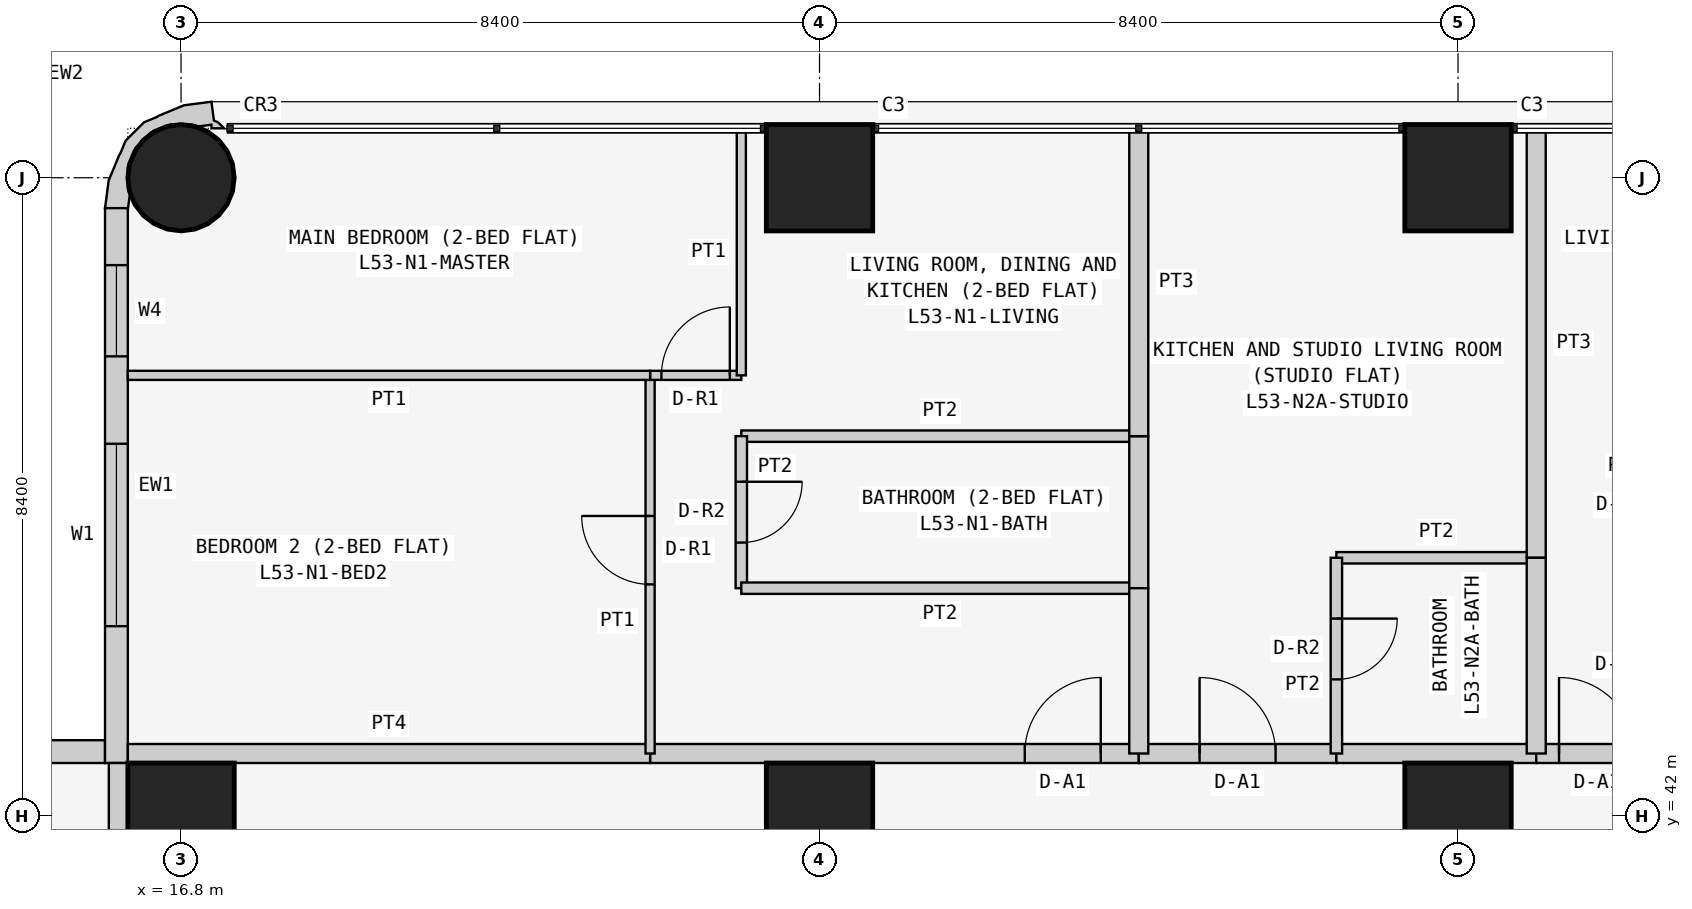
"""IFC4 building model, lengths in metres.
Left out: names, types, materials, properties, quantities, classifications, styles, units other than length and angle.
Written with IfcOpenShell. Run it as: python <this file> out.ifc"""

import sys

from ifc_helpers import new_model, si_unit, direction, frame, frame_2d, origin, origin_2d, place, context, subcontext, project, spatial, polyline, rectangle, circle, outline, extrude, element, fill, save


model = new_model("IFC4")
c1 = context("Model", 3, precision=1e-05, world=origin(), true_north=direction((0.0, 1.0)))
c2 = subcontext(c1, "Body", "Model", "MODEL_VIEW")
j1 = project(units=[si_unit("LENGTHUNIT", "METRE"), si_unit("PLANEANGLEUNIT", "RADIAN")], contexts=[c1])
p1 = place(None, origin())
s1 = spatial("IfcSite", under=j1, at=p1, CompositionType="ELEMENT")
p2 = place(p1, origin())
s2 = spatial("IfcBuilding", under=s1, at=p2, CompositionType="ELEMENT")
p3 = place(p2, frame((0.0, 0.0, 204.9)))
s3 = spatial("IfcBuildingStorey", under=s2, at=p3, CompositionType="ELEMENT", Elevation=204.9)
p4 = place(p3, frame((16.8, 42.0, 0.0), z_axis=(0.0, 0.0, 1.0), x_axis=(1.0, 0.0, 0.0)))
e1 = element("IfcColumn", 1, at=p4, inside=s3, PredefinedType="COLUMN", context=c2, shape_type="SweptSolid", body=[
    extrude(rectangle(XDim=1.4, YDim=1.4, at=origin_2d()), origin(), (0.0, 0.0, 1.0), 3.6),
])
p5 = place(p3, frame((16.8, 50.4, 0.0), z_axis=(0.0, 0.0, 1.0), x_axis=(1.0, 0.0, 0.0)))
e2 = element("IfcColumn", 2, at=p5, inside=s3, PredefinedType="COLUMN", context=c2, shape_type="SweptSolid", body=[
    extrude(circle(Radius=0.7, at=origin_2d()), origin(), (0.0, 0.0, 1.0), 3.6),
])
for number, where, z_axis, x_axis in (
    (3, (25.2, 42.0, 0.0), (0.0, 0.0, 1.0), (1.0, 0.0, 0.0)),
    (4, (25.2, 50.4, 0.0), (0.0, 0.0, 1.0), (1.0, 0.0, 0.0)),
    (5, (33.6, 42.0, 0.0), (0.0, 0.0, 1.0), (1.0, 0.0, 0.0)),
    (6, (33.6, 50.4, 0.0), (0.0, 0.0, 1.0), (1.0, 0.0, 0.0)),
):
    element("IfcColumn", number, at=place(p3, frame(where, z_axis=z_axis, x_axis=x_axis)), inside=s3, PredefinedType="COLUMN", context=c2, shape_type="SweptSolid", body=[
        extrude(rectangle(XDim=1.4, YDim=1.4, at=origin_2d()), origin(), (0.0, 0.0, 1.0), 3.6),
    ])
p6 = place(p3, frame((15.8, 42.85, 0.0), z_axis=(0.0, 0.0, 1.0), x_axis=(-1.0, 0.0, 0.0)))
e7 = element("IfcWall", 7, at=p6, inside=s3, PredefinedType="SOLIDWALL", context=c2, shape_type="SweptSolid", body=[
    extrude(rectangle(XDim=15.4, YDim=0.3, at=frame_2d((7.7, 0.0))), origin(), (0.0, 0.0, 1.0), 3.45),
])
p7 = place(p6, frame((1.2, 0.0, 0.9)))
e8 = element("IfcOpeningElement", 8, at=p7, cuts=e7, PredefinedType="OPENING", context=c2, shape_type="SweptSolid", body=[
    extrude(rectangle(XDim=1.8, YDim=1.5, at=frame_2d((0.9, 0.75))), frame((0.0, 0.16, 0.0), z_axis=(0.0, -1.0, 0.0), x_axis=(1.0, 0.0, 0.0)), (0.0, 0.0, 1.0), 0.32),
])
p8 = place(p6, frame((4.95, 0.0, 1.5)))
e9 = element("IfcOpeningElement", 9, at=p8, cuts=e7, PredefinedType="OPENING", context=c2, shape_type="SweptSolid", body=[
    extrude(rectangle(XDim=0.9, YDim=0.7, at=frame_2d((0.45, 0.35))), frame((0.0, 0.16, 0.0), z_axis=(0.0, -1.0, 0.0), x_axis=(1.0, 0.0, 0.0)), (0.0, 0.0, 1.0), 0.32),
])
p9 = place(p6, frame((8.5, 0.0, 0.9)))
e10 = element("IfcOpeningElement", 10, at=p9, cuts=e7, PredefinedType="OPENING", context=c2, shape_type="SweptSolid", body=[
    extrude(rectangle(XDim=1.8, YDim=1.5, at=frame_2d((0.9, 0.75))), frame((0.0, 0.16, 0.0), z_axis=(0.0, -1.0, 0.0), x_axis=(1.0, 0.0, 0.0)), (0.0, 0.0, 1.0), 0.32),
])
p10 = place(p6, frame((12.5, 0.0, 0.0)))
e11 = element("IfcOpeningElement", 11, at=p10, cuts=e7, PredefinedType="OPENING", context=c2, shape_type="SweptSolid", body=[
    extrude(rectangle(XDim=0.9, YDim=2.4, at=frame_2d((0.45, 1.2))), frame((0.0, 0.16, 0.0), z_axis=(0.0, -1.0, 0.0), x_axis=(1.0, 0.0, 0.0)), (0.0, 0.0, 1.0), 0.32),
])
p11 = place(p6, frame((13.5, 0.0, 0.9)))
e12 = element("IfcOpeningElement", 12, at=p11, cuts=e7, PredefinedType="OPENING", context=c2, shape_type="SweptSolid", body=[
    extrude(rectangle(XDim=1.2, YDim=1.5, at=frame_2d((0.6, 0.75))), frame((0.0, 0.16, 0.0), z_axis=(0.0, -1.0, 0.0), x_axis=(1.0, 0.0, 0.0)), (0.0, 0.0, 1.0), 0.32),
])
p12 = place(p3, frame((15.95, 50.0, 0.0), z_axis=(0.0, 0.0, 1.0), x_axis=(0.0, -1.0, 0.0)))
e13 = element("IfcWall", 13, at=p12, inside=s3, PredefinedType="SOLIDWALL", context=c2, shape_type="SweptSolid", body=[
    extrude(rectangle(XDim=7.3, YDim=0.3, at=frame_2d((3.65, 0.0))), origin(), (0.0, 0.0, 1.0), 3.45),
])
p13 = place(p12, frame((3.1, 0.0, 0.9)))
e14 = element("IfcOpeningElement", 14, at=p13, cuts=e13, PredefinedType="OPENING", context=c2, shape_type="SweptSolid", body=[
    extrude(rectangle(XDim=2.4, YDim=1.5, at=frame_2d((1.2, 0.75))), frame((0.0, 0.16, 0.0), z_axis=(0.0, -1.0, 0.0), x_axis=(1.0, 0.0, 0.0)), (0.0, 0.0, 1.0), 0.32),
])
p14 = place(p12, frame((0.75, 0.0, 0.9)))
e15 = element("IfcOpeningElement", 15, at=p14, cuts=e13, PredefinedType="OPENING", context=c2, shape_type="SweptSolid", body=[
    extrude(rectangle(XDim=1.2, YDim=1.5, at=frame_2d((0.6, 0.75))), frame((0.0, 0.16, 0.0), z_axis=(0.0, -1.0, 0.0), x_axis=(1.0, 0.0, 0.0)), (0.0, 0.0, 1.0), 0.32),
])
p15 = place(p3, frame((17.312, 50.988, 0.0), z_axis=(0.0, 0.0, 1.0), x_axis=(-0.439933741929, 0.898030234854, 0.0)))
e16 = element("IfcWall", 16, at=p15, inside=s3, PredefinedType="SOLIDWALL", context=c2, shape_type="SweptSolid", body=[
    extrude(outline(polyline([(0.138, -0.039), (0.182, -0.0), (0.419, -0.08), (0.536, 0.266), (0.559, 0.631), (0.555, 0.651), (0.566, 0.836), (0.456, 1.159), (0.333, 1.298), (0.324, 1.316), (0.082, 1.591), (-0.222, 1.793), (-0.39, 1.541), (-0.372, 1.532), (-0.195, 1.414), (-0.12, 1.41), (0.131, 1.287), (0.315, 1.078), (0.406, 0.814), (0.388, 0.536), (0.265, 0.285), (0.209, 0.236), (0.148, 0.053), (0.105, 0.074), (0.032, -0.076), (0.138, -0.039)])), origin(), (0.0, 0.0, 1.0), 3.45),
])
p16 = place(p3, frame((22.971, 42.825, 0.0), z_axis=(0.0, 0.0, 1.0), x_axis=(1.0, 0.0, 0.0)))
e17 = element("IfcWall", 17, at=p16, inside=s3, PredefinedType="PARTITIONING", context=c2, shape_type="SweptSolid", body=[
    extrude(rectangle(XDim=6.429, YDim=0.25, at=frame_2d((3.214, 0.0))), origin(), (0.0, 0.0, 1.0), 3.45),
])
p17 = place(p16, frame((4.929, 0.0, 0.0)))
e18 = element("IfcOpeningElement", 18, at=p17, cuts=e17, PredefinedType="OPENING", context=c2, shape_type="SweptSolid", body=[
    extrude(rectangle(XDim=1.0, YDim=2.1, at=frame_2d((0.5, 1.05))), frame((0.0, 0.135, 0.0), z_axis=(0.0, -1.0, 0.0), x_axis=(1.0, 0.0, 0.0)), (0.0, 0.0, 1.0), 0.27),
])
p18 = place(p3, frame((16.1, 42.825, 0.0), z_axis=(0.0, 0.0, 1.0), x_axis=(1.0, 0.0, 0.0)))
e19 = element("IfcWall", 19, at=p18, inside=s3, PredefinedType="PARTITIONING", context=c2, shape_type="SweptSolid", body=[
    extrude(rectangle(XDim=6.871, YDim=0.25, at=frame_2d((3.436, 0.0))), origin(), (0.0, 0.0, 1.0), 3.45),
])
p19 = place(p3, frame((29.4, 42.825, 0.0), z_axis=(0.0, 0.0, 1.0), x_axis=(1.0, 0.0, 0.0)))
e20 = element("IfcWall", 20, at=p19, inside=s3, PredefinedType="PARTITIONING", context=c2, shape_type="SweptSolid", body=[
    extrude(rectangle(XDim=2.6, YDim=0.25, at=frame_2d((1.3, 0.0))), origin(), (0.0, 0.0, 1.0), 3.45),
])
p20 = place(p19, frame((0.8, 0.0, 0.0)))
e21 = element("IfcOpeningElement", 21, at=p20, cuts=e20, PredefinedType="OPENING", context=c2, shape_type="SweptSolid", body=[
    extrude(rectangle(XDim=1.0, YDim=2.1, at=frame_2d((0.5, 1.05))), frame((0.0, 0.135, 0.0), z_axis=(0.0, -1.0, 0.0), x_axis=(1.0, 0.0, 0.0)), (0.0, 0.0, 1.0), 0.27),
])
p21 = place(p3, frame((32.0, 42.825, 0.0), z_axis=(0.0, 0.0, 1.0), x_axis=(1.0, 0.0, 0.0)))
e22 = element("IfcWall", 22, at=p21, inside=s3, PredefinedType="PARTITIONING", context=c2, shape_type="SweptSolid", body=[
    extrude(rectangle(XDim=2.629, YDim=0.25, at=frame_2d((1.314, 0.0))), origin(), (0.0, 0.0, 1.0), 3.45),
])
p22 = place(p3, frame((34.629, 42.825, 0.0), z_axis=(0.0, 0.0, 1.0), x_axis=(1.0, 0.0, 0.0)))
e23 = element("IfcWall", 23, at=p22, inside=s3, PredefinedType="PARTITIONING", context=c2, shape_type="SweptSolid", body=[
    extrude(rectangle(XDim=1.6, YDim=0.25, at=frame_2d((0.8, 0.0))), origin(), (0.0, 0.0, 1.0), 3.45),
])
p23 = place(p22, frame((0.3, 0.0, 0.0)))
e24 = element("IfcOpeningElement", 24, at=p23, cuts=e23, PredefinedType="OPENING", context=c2, shape_type="SweptSolid", body=[
    extrude(rectangle(XDim=1.0, YDim=2.1, at=frame_2d((0.5, 1.05))), frame((0.0, 0.135, 0.0), z_axis=(0.0, -1.0, 0.0), x_axis=(1.0, 0.0, 0.0)), (0.0, 0.0, 1.0), 0.27),
])
p24 = place(p3, frame((15.975, 35.829, 0.0), z_axis=(0.0, 0.0, 1.0), x_axis=(0.0, 1.0, 0.0)))
e25 = element("IfcWall", 25, at=p24, inside=s3, PredefinedType="PARTITIONING", context=c2, shape_type="SweptSolid", body=[
    extrude(rectangle(XDim=6.871, YDim=0.25, at=frame_2d((3.436, 0.0))), origin(), (0.0, 0.0, 1.0), 3.45),
])
p25 = place(p3, frame((29.4, 47.0, 0.0), z_axis=(0.0, 0.0, 1.0), x_axis=(-1.0, 0.0, 0.0)))
e26 = element("IfcWall", 26, at=p25, inside=s3, PredefinedType="PARTITIONING", context=c2, shape_type="SweptSolid", body=[
    extrude(rectangle(XDim=5.229, YDim=0.15, at=frame_2d((2.615, 0.0))), origin(), (0.0, 0.0, 1.0), 3.45),
])
p26 = place(p3, frame((24.171, 47.0, 0.0), z_axis=(0.0, 0.0, 1.0), x_axis=(0.0, -1.0, 0.0)))
e27 = element("IfcWall", 27, at=p26, inside=s3, PredefinedType="PARTITIONING", context=c2, shape_type="SweptSolid", body=[
    extrude(rectangle(XDim=2.0, YDim=0.15, at=frame_2d((1.0, 0.0))), origin(), (0.0, 0.0, 1.0), 3.45),
])
p27 = place(p26, frame((0.6, 0.0, 0.0)))
e28 = element("IfcOpeningElement", 28, at=p27, cuts=e27, PredefinedType="OPENING", context=c2, shape_type="SweptSolid", body=[
    extrude(rectangle(XDim=0.8, YDim=2.1, at=frame_2d((0.4, 1.05))), frame((0.0, 0.085, 0.0), z_axis=(0.0, -1.0, 0.0), x_axis=(1.0, 0.0, 0.0)), (0.0, 0.0, 1.0), 0.17),
])
p28 = place(p3, frame((24.171, 45.0, 0.0), z_axis=(0.0, 0.0, 1.0), x_axis=(1.0, 0.0, 0.0)))
e29 = element("IfcWall", 29, at=p28, inside=s3, PredefinedType="PARTITIONING", context=c2, shape_type="SweptSolid", body=[
    extrude(rectangle(XDim=5.229, YDim=0.15, at=frame_2d((2.615, 0.0))), origin(), (0.0, 0.0, 1.0), 3.45),
])
p29 = place(p3, frame((29.4, 45.0, 0.0), z_axis=(0.0, 0.0, 1.0), x_axis=(0.0, 1.0, 0.0)))
e30 = element("IfcWall", 30, at=p29, inside=s3, PredefinedType="PARTITIONING", context=c2, shape_type="SweptSolid", body=[
    extrude(rectangle(XDim=2.0, YDim=0.25, at=frame_2d((1.0, 0.0))), origin(), (0.0, 0.0, 1.0), 2.848),
])
p30 = place(p3, frame((22.971, 42.825, 0.0), z_axis=(0.0, 0.0, 1.0), x_axis=(0.0, 1.0, 0.0)))
e31 = element("IfcWall", 31, at=p30, inside=s3, PredefinedType="PARTITIONING", context=c2, shape_type="SweptSolid", body=[
    extrude(rectangle(XDim=4.975, YDim=0.12, at=frame_2d((2.488, 0.0))), origin(), (0.0, 0.0, 1.0), 3.45),
])
p31 = place(p30, frame((2.225, 0.0, 0.0)))
e32 = element("IfcOpeningElement", 32, at=p31, cuts=e31, PredefinedType="OPENING", context=c2, shape_type="SweptSolid", body=[
    extrude(rectangle(XDim=0.9, YDim=2.1, at=frame_2d((0.45, 1.05))), frame((0.0, 0.07, 0.0), z_axis=(0.0, -1.0, 0.0), x_axis=(1.0, 0.0, 0.0)), (0.0, 0.0, 1.0), 0.14),
])
p32 = place(p3, frame((22.971, 47.8, 0.0), z_axis=(0.0, 0.0, 1.0), x_axis=(1.0, 0.0, 0.0)))
e33 = element("IfcWall", 33, at=p32, inside=s3, PredefinedType="PARTITIONING", context=c2, shape_type="SweptSolid", body=[
    extrude(rectangle(XDim=1.2, YDim=0.12, at=frame_2d((0.6, 0.0))), origin(), (0.0, 0.0, 1.0), 3.45),
])
p33 = place(p32, frame((0.149, 0.0, 0.0)))
e34 = element("IfcOpeningElement", 34, at=p33, cuts=e33, PredefinedType="OPENING", context=c2, shape_type="SweptSolid", body=[
    extrude(rectangle(XDim=0.9, YDim=2.1, at=frame_2d((0.45, 1.05))), frame((0.0, 0.07, 0.0), z_axis=(0.0, -1.0, 0.0), x_axis=(1.0, 0.0, 0.0)), (0.0, 0.0, 1.0), 0.14),
])
p34 = place(p3, frame((24.171, 47.8, 0.0), z_axis=(0.0, 0.0, 1.0), x_axis=(0.0, 1.0, 0.0)))
e35 = element("IfcWall", 35, at=p34, inside=s3, PredefinedType="PARTITIONING", context=c2, shape_type="SweptSolid", body=[
    extrude(rectangle(XDim=3.25, YDim=0.12, at=frame_2d((1.625, 0.0))), origin(), (0.0, 0.0, 1.0), 3.45),
])
p35 = place(p3, frame((29.4, 45.0, 0.0), z_axis=(0.0, 0.0, 1.0), x_axis=(0.0, -1.0, 0.0)))
e36 = element("IfcWall", 36, at=p35, inside=s3, PredefinedType="PARTITIONING", context=c2, shape_type="SweptSolid", body=[
    extrude(rectangle(XDim=2.175, YDim=0.25, at=frame_2d((1.087, 0.0))), origin(), (0.0, 0.0, 1.0), 2.848),
])
p36 = place(p3, frame((29.4, 51.05, 0.0), z_axis=(0.0, 0.0, 1.0), x_axis=(0.0, -1.0, 0.0)))
e37 = element("IfcWall", 37, at=p36, inside=s3, PredefinedType="PARTITIONING", context=c2, shape_type="SweptSolid", body=[
    extrude(rectangle(XDim=4.05, YDim=0.25, at=frame_2d((2.025, 0.0))), origin(), (0.0, 0.0, 1.0), 2.848),
])
p37 = place(p3, frame((22.971, 47.8, 0.0), z_axis=(0.0, 0.0, 1.0), x_axis=(-1.0, 0.0, 0.0)))
e38 = element("IfcWall", 38, at=p37, inside=s3, PredefinedType="PARTITIONING", context=c2, shape_type="SweptSolid", body=[
    extrude(rectangle(XDim=6.871, YDim=0.12, at=frame_2d((3.436, 0.0))), origin(), (0.0, 0.0, 1.0), 3.45),
])
p38 = place(p3, frame((34.629, 45.4, 0.0), z_axis=(0.0, 0.0, 1.0), x_axis=(-1.0, 0.0, 0.0)))
e39 = element("IfcWall", 39, at=p38, inside=s3, PredefinedType="PARTITIONING", context=c2, shape_type="SweptSolid", body=[
    extrude(rectangle(XDim=2.629, YDim=0.15, at=frame_2d((1.314, 0.0))), origin(), (0.0, 0.0, 1.0), 3.45),
])
p39 = place(p3, frame((32.0, 45.4, 0.0), z_axis=(0.0, 0.0, 1.0), x_axis=(0.0, -1.0, 0.0)))
e40 = element("IfcWall", 40, at=p39, inside=s3, PredefinedType="PARTITIONING", context=c2, shape_type="SweptSolid", body=[
    extrude(rectangle(XDim=2.575, YDim=0.15, at=frame_2d((1.288, 0.0))), origin(), (0.0, 0.0, 1.0), 3.45),
])
p40 = place(p39, frame((0.8, 0.0, 0.0)))
e41 = element("IfcOpeningElement", 41, at=p40, cuts=e40, PredefinedType="OPENING", context=c2, shape_type="SweptSolid", body=[
    extrude(rectangle(XDim=0.8, YDim=2.1, at=frame_2d((0.4, 1.05))), frame((0.0, 0.085, 0.0), z_axis=(0.0, -1.0, 0.0), x_axis=(1.0, 0.0, 0.0)), (0.0, 0.0, 1.0), 0.17),
])
p41 = place(p3, frame((34.629, 51.05, 0.0), z_axis=(0.0, 0.0, 1.0), x_axis=(0.0, -1.0, 0.0)))
e42 = element("IfcWall", 42, at=p41, inside=s3, PredefinedType="PARTITIONING", context=c2, shape_type="SweptSolid", body=[
    extrude(rectangle(XDim=5.65, YDim=0.25, at=frame_2d((2.825, 0.0))), origin(), (0.0, 0.0, 1.0), 3.45),
])
p42 = place(p3, frame((34.629, 45.4, 0.0), z_axis=(0.0, 0.0, 1.0), x_axis=(0.0, -1.0, 0.0)))
e43 = element("IfcWall", 43, at=p42, inside=s3, PredefinedType="PARTITIONING", context=c2, shape_type="SweptSolid", body=[
    extrude(rectangle(XDim=2.575, YDim=0.25, at=frame_2d((1.288, 0.0))), origin(), (0.0, 0.0, 1.0), 3.45),
])
p43 = place(p13, origin())
e44 = element("IfcWindow", 44, at=p43, inside=s3, PartitioningType="SINGLE_PANEL", PredefinedType="WINDOW", context=c2, shape_type="SweptSolid", body=[
    extrude(rectangle(XDim=2.4, YDim=1.5, at=frame_2d((1.2, 0.75))), frame((0.0, 0.03, 0.0), z_axis=(0.0, -1.0, 0.0), x_axis=(1.0, 0.0, 0.0)), (0.0, 0.0, 1.0), 0.06),
])
fill(e14, e44)
p44 = place(p14, origin())
e45 = element("IfcWindow", 45, at=p44, inside=s3, PartitioningType="SINGLE_PANEL", PredefinedType="WINDOW", context=c2, shape_type="SweptSolid", body=[
    extrude(rectangle(XDim=1.2, YDim=1.5, at=frame_2d((0.6, 0.75))), frame((0.0, 0.03, 0.0), z_axis=(0.0, -1.0, 0.0), x_axis=(1.0, 0.0, 0.0)), (0.0, 0.0, 1.0), 0.06),
])
fill(e15, e45)
p45 = place(p17, origin())
e46 = element("IfcDoor", 46, at=p45, inside=s3, OperationType="SINGLE_SWING_RIGHT", PredefinedType="DOOR", context=c2, shape_type="SweptSolid", body=[
    extrude(rectangle(XDim=1.0, YDim=2.1, at=frame_2d((0.5, 1.05))), frame((0.0, 0.025, 0.0), z_axis=(0.0, -1.0, 0.0), x_axis=(1.0, 0.0, 0.0)), (0.0, 0.0, 1.0), 0.05),
])
fill(e18, e46)
p46 = place(p27, origin())
e47 = element("IfcDoor", 47, at=p46, inside=s3, OperationType="SINGLE_SWING_LEFT", PredefinedType="DOOR", context=c2, shape_type="SweptSolid", body=[
    extrude(rectangle(XDim=0.8, YDim=2.1, at=frame_2d((0.4, 1.05))), frame((0.0, 0.025, 0.0), z_axis=(0.0, -1.0, 0.0), x_axis=(1.0, 0.0, 0.0)), (0.0, 0.0, 1.0), 0.05),
])
fill(e28, e47)
p47 = place(p31, origin())
e48 = element("IfcDoor", 48, at=p47, inside=s3, OperationType="SINGLE_SWING_RIGHT", PredefinedType="DOOR", context=c2, shape_type="SweptSolid", body=[
    extrude(rectangle(XDim=0.9, YDim=2.1, at=frame_2d((0.45, 1.05))), frame((0.0, 0.025, 0.0), z_axis=(0.0, -1.0, 0.0), x_axis=(1.0, 0.0, 0.0)), (0.0, 0.0, 1.0), 0.05),
])
fill(e32, e48)
p48 = place(p33, origin())
e49 = element("IfcDoor", 49, at=p48, inside=s3, OperationType="SINGLE_SWING_RIGHT", PredefinedType="DOOR", context=c2, shape_type="SweptSolid", body=[
    extrude(rectangle(XDim=0.9, YDim=2.1, at=frame_2d((0.45, 1.05))), frame((0.0, 0.025, 0.0), z_axis=(0.0, -1.0, 0.0), x_axis=(1.0, 0.0, 0.0)), (0.0, 0.0, 1.0), 0.05),
])
fill(e34, e49)
p49 = place(p20, origin())
e50 = element("IfcDoor", 50, at=p49, inside=s3, OperationType="SINGLE_SWING_LEFT", PredefinedType="DOOR", context=c2, shape_type="SweptSolid", body=[
    extrude(rectangle(XDim=1.0, YDim=2.1, at=frame_2d((0.5, 1.05))), frame((0.0, 0.025, 0.0), z_axis=(0.0, -1.0, 0.0), x_axis=(1.0, 0.0, 0.0)), (0.0, 0.0, 1.0), 0.05),
])
fill(e21, e50)
p50 = place(p40, origin())
e51 = element("IfcDoor", 51, at=p50, inside=s3, OperationType="SINGLE_SWING_LEFT", PredefinedType="DOOR", context=c2, shape_type="SweptSolid", body=[
    extrude(rectangle(XDim=0.8, YDim=2.1, at=frame_2d((0.4, 1.05))), frame((0.0, 0.025, 0.0), z_axis=(0.0, -1.0, 0.0), x_axis=(1.0, 0.0, 0.0)), (0.0, 0.0, 1.0), 0.05),
])
fill(e41, e51)
p51 = place(p23, origin())
e52 = element("IfcDoor", 52, at=p51, inside=s3, OperationType="SINGLE_SWING_LEFT", PredefinedType="DOOR", context=c2, shape_type="SweptSolid", body=[
    extrude(rectangle(XDim=1.0, YDim=2.1, at=frame_2d((0.5, 1.05))), frame((0.0, 0.025, 0.0), z_axis=(0.0, -1.0, 0.0), x_axis=(1.0, 0.0, 0.0)), (0.0, 0.0, 1.0), 0.05),
])
fill(e24, e52)
save(model, sys.argv[1])
